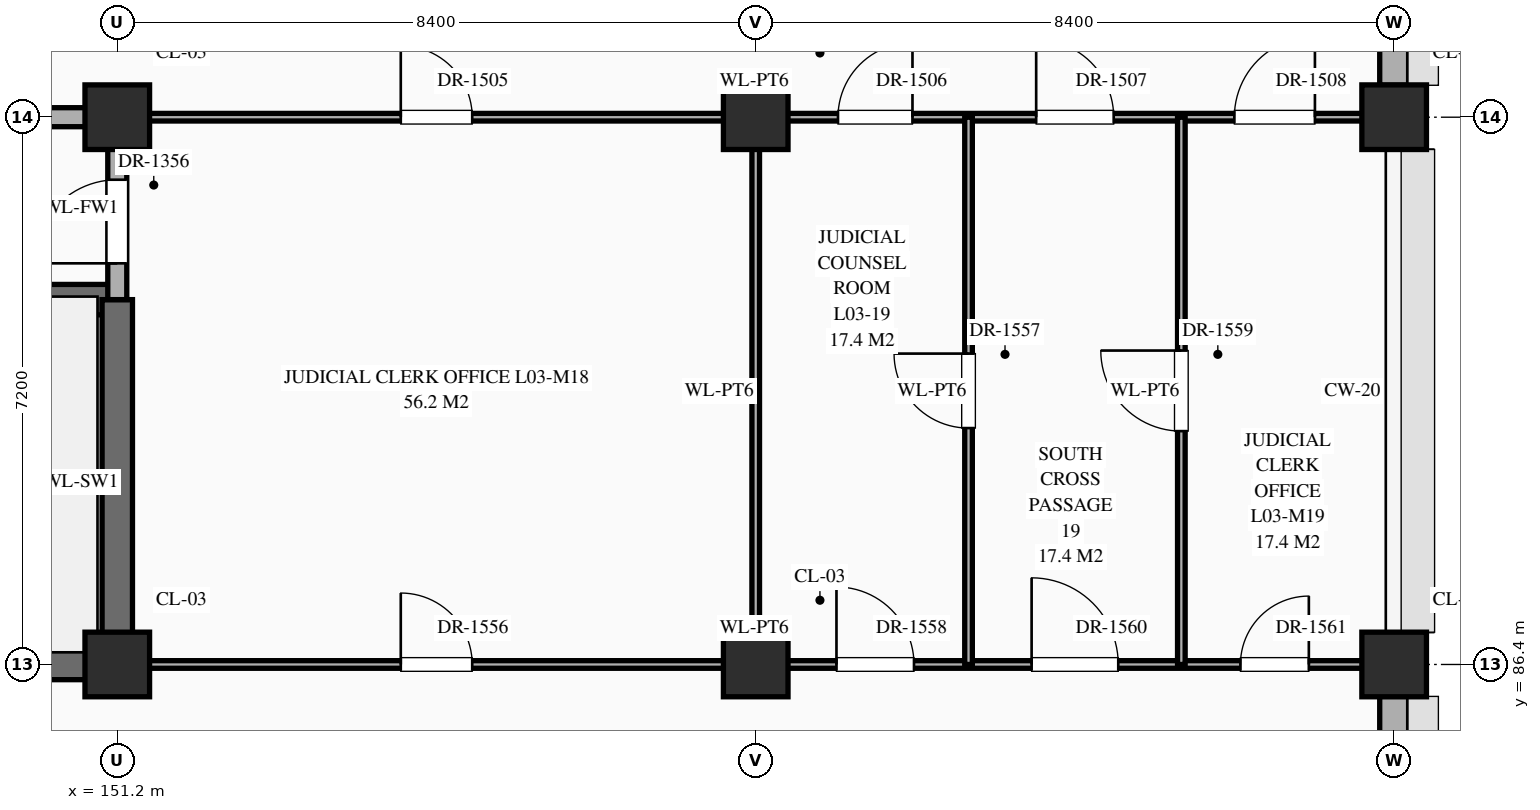
"""IFC4 building model, lengths in metres.
Left out: names, types, materials, properties, quantities, classifications, styles, units other than length and angle.
Written with IfcOpenShell. Run it as: python <this file> out.ifc"""

import sys

from ifc_helpers import new_model, si_unit, direction, frame, frame_2d, origin, origin_2d, place, context, subcontext, project, spatial, rectangle, extrude, element, fill, save


model = new_model("IFC4")
c1 = context("Model", 3, precision=1e-05, world=origin(), true_north=direction((0.0, 1.0)))
c2 = subcontext(c1, "Body", "Model", "MODEL_VIEW")
j1 = project(units=[si_unit("LENGTHUNIT", "METRE"), si_unit("PLANEANGLEUNIT", "RADIAN")], contexts=[c1])
p1 = place(None, origin())
s1 = spatial("IfcSite", under=j1, at=p1, CompositionType="ELEMENT")
p2 = place(p1, origin())
s2 = spatial("IfcBuilding", under=s1, at=p2, CompositionType="ELEMENT")
p3 = place(p2, frame((0.0, 0.0, 10.8)))
s3 = spatial("IfcBuildingStorey", under=s2, at=p3, CompositionType="ELEMENT", Elevation=10.8)
for number, where, z_axis, x_axis in (
    (1, (151.2, 86.4, 0.0), (0.0, 0.0, 1.0), (1.0, 0.0, 0.0)),
    (2, (151.2, 93.6, 0.0), (0.0, 0.0, 1.0), (1.0, 0.0, 0.0)),
    (3, (159.6, 86.4, 0.0), (0.0, 0.0, 1.0), (1.0, 0.0, 0.0)),
    (4, (159.6, 93.6, 0.0), (0.0, 0.0, 1.0), (1.0, 0.0, 0.0)),
    (5, (168.0, 86.4, 0.0), (0.0, 0.0, 1.0), (1.0, 0.0, 0.0)),
    (6, (168.0, 93.6, 0.0), (0.0, 0.0, 1.0), (1.0, 0.0, 0.0)),
):
    element("IfcColumn", number, at=place(p3, frame(where, z_axis=z_axis, x_axis=x_axis)), inside=s3, PredefinedType="COLUMN", context=c2, shape_type="SweptSolid", body=[
        extrude(rectangle(XDim=0.85, YDim=0.85, at=origin_2d()), origin(), (0.0, 0.0, 1.0), 5.4),
    ])
p4 = place(p3, frame((168.0, 79.62, 0.0), z_axis=(0.0, 0.0, 1.0), x_axis=(0.0, 1.0, 0.0)))
e7 = element("IfcWall", 7, at=p4, inside=s3, PredefinedType="STANDARD", context=c2, shape_type="SweptSolid", body=[
    extrude(rectangle(XDim=6.36, YDim=0.38, at=frame_2d((3.18, 0.0))), origin(), (0.0, 0.0, 1.0), 4.47),
])
p5 = place(p4, frame((1.455, 0.0, 0.85)))
e8 = element("IfcOpeningElement", 8, at=p5, cuts=e7, PredefinedType="OPENING", context=c2, shape_type="SweptSolid", body=[
    extrude(rectangle(XDim=1.05, YDim=1.92, at=frame_2d((0.525, 0.96))), frame((0.0, 0.202, 0.0), z_axis=(0.0, -1.0, 0.0), x_axis=(1.0, 0.0, 0.0)), (0.0, 0.0, 1.0), 0.404),
])
p6 = place(p3, frame((168.0, 94.02, 0.0), z_axis=(0.0, 0.0, 1.0), x_axis=(0.0, 1.0, 0.0)))
e9 = element("IfcWall", 9, at=p6, inside=s3, PredefinedType="STANDARD", context=c2, shape_type="SweptSolid", body=[
    extrude(rectangle(XDim=6.36, YDim=0.38, at=frame_2d((3.18, 0.0))), origin(), (0.0, 0.0, 1.0), 4.47),
])
p7 = place(p6, frame((3.805, 0.0, 0.85)))
e10 = element("IfcOpeningElement", 10, at=p7, cuts=e9, PredefinedType="OPENING", context=c2, shape_type="SweptSolid", body=[
    extrude(rectangle(XDim=1.35, YDim=1.2, at=frame_2d((0.675, 0.6))), frame((0.0, 0.202, 0.0), z_axis=(0.0, -1.0, 0.0), x_axis=(1.0, 0.0, 0.0)), (0.0, 0.0, 1.0), 0.404),
])
p8 = place(p3, frame((142.8, 86.4, 0.0), z_axis=(0.0, 0.0, 1.0), x_axis=(1.0, 0.0, 0.0)))
e11 = element("IfcWall", 11, at=p8, inside=s3, PredefinedType="SHEAR", context=c2, shape_type="SweptSolid", body=[
    extrude(rectangle(XDim=8.4, YDim=0.4, at=frame_2d((4.2, 0.0))), origin(), (0.0, 0.0, 1.0), 5.12),
])
p9 = place(p3, frame((151.2, 86.4, 0.0), z_axis=(0.0, 0.0, 1.0), x_axis=(1.0, 0.0, 0.0)))
e12 = element("IfcWall", 12, at=p9, inside=s3, PredefinedType="STANDARD", context=c2, shape_type="SweptSolid", body=[
    extrude(rectangle(XDim=16.76, YDim=0.1, at=frame_2d((8.38, 0.0))), origin(), (0.0, 0.0, 1.0), 4.27),
])
p10 = place(p9, frame((3.73, 0.0, 0.0)))
e13 = element("IfcOpeningElement", 13, at=p10, cuts=e12, PredefinedType="OPENING", context=c2, shape_type="SweptSolid", body=[
    extrude(rectangle(XDim=0.94, YDim=2.3, at=frame_2d((0.47, 1.15))), frame((0.0, 0.062, 0.0), z_axis=(0.0, -1.0, 0.0), x_axis=(1.0, 0.0, 0.0)), (0.0, 0.0, 1.0), 0.124),
])
p11 = place(p9, frame((9.462, 0.0, 0.0)))
e14 = element("IfcOpeningElement", 14, at=p11, cuts=e12, PredefinedType="OPENING", context=c2, shape_type="SweptSolid", body=[
    extrude(rectangle(XDim=1.02, YDim=2.4, at=frame_2d((0.51, 1.2))), frame((0.0, 0.062, 0.0), z_axis=(0.0, -1.0, 0.0), x_axis=(1.0, 0.0, 0.0)), (0.0, 0.0, 1.0), 0.124),
])
p12 = place(p9, frame((12.03, 0.0, 0.0)))
e15 = element("IfcOpeningElement", 15, at=p12, cuts=e12, PredefinedType="OPENING", context=c2, shape_type="SweptSolid", body=[
    extrude(rectangle(XDim=1.14, YDim=2.4, at=frame_2d((0.57, 1.2))), frame((0.0, 0.062, 0.0), z_axis=(0.0, -1.0, 0.0), x_axis=(1.0, 0.0, 0.0)), (0.0, 0.0, 1.0), 0.124),
])
p13 = place(p9, frame((14.778, 0.0, 0.0)))
e16 = element("IfcOpeningElement", 16, at=p13, cuts=e12, PredefinedType="OPENING", context=c2, shape_type="SweptSolid", body=[
    extrude(rectangle(XDim=0.9, YDim=2.15, at=frame_2d((0.45, 1.075))), frame((0.0, 0.062, 0.0), z_axis=(0.0, -1.0, 0.0), x_axis=(1.0, 0.0, 0.0)), (0.0, 0.0, 1.0), 0.124),
])
p14 = place(p3, frame((142.8, 91.2, 0.0), z_axis=(0.0, 0.0, 1.0), x_axis=(1.0, 0.0, 0.0)))
e17 = element("IfcWall", 17, at=p14, inside=s3, PredefinedType="SHEAR", context=c2, shape_type="SweptSolid", body=[
    extrude(rectangle(XDim=8.4, YDim=0.4, at=frame_2d((4.2, 0.0))), origin(), (0.0, 0.0, 1.0), 5.12),
])
p15 = place(p14, frame((0.65, 0.0, 0.0)))
e18 = element("IfcOpeningElement", 18, at=p15, cuts=e17, PredefinedType="OPENING", context=c2, shape_type="SweptSolid", body=[
    extrude(rectangle(XDim=1.1, YDim=2.2, at=frame_2d((0.55, 1.1))), frame((0.0, 0.212, 0.0), z_axis=(0.0, -1.0, 0.0), x_axis=(1.0, 0.0, 0.0)), (0.0, 0.0, 1.0), 0.424),
])
p16 = place(p3, frame((142.8, 93.6, 0.0), z_axis=(0.0, 0.0, 1.0), x_axis=(1.0, 0.0, 0.0)))
e19 = element("IfcWall", 19, at=p16, inside=s3, PredefinedType="STANDARD", context=c2, shape_type="SweptSolid", body=[
    extrude(rectangle(XDim=8.4, YDim=0.25, at=frame_2d((4.2, 0.0))), origin(), (0.0, 0.0, 1.0), 4.27),
])
p17 = place(p16, frame((3.3, 0.0, 0.0)))
e20 = element("IfcOpeningElement", 20, at=p17, cuts=e19, PredefinedType="OPENING", context=c2, shape_type="SweptSolid", body=[
    extrude(rectangle(XDim=1.8, YDim=2.35, at=frame_2d((0.9, 1.175))), frame((0.0, 0.137, 0.0), z_axis=(0.0, -1.0, 0.0), x_axis=(1.0, 0.0, 0.0)), (0.0, 0.0, 1.0), 0.274),
])
p18 = place(p3, frame((151.2, 93.6, 0.0), z_axis=(0.0, 0.0, 1.0), x_axis=(1.0, 0.0, 0.0)))
e21 = element("IfcWall", 21, at=p18, inside=s3, PredefinedType="STANDARD", context=c2, shape_type="SweptSolid", body=[
    extrude(rectangle(XDim=16.76, YDim=0.1, at=frame_2d((8.38, 0.0))), origin(), (0.0, 0.0, 1.0), 4.27),
])
p19 = place(p18, frame((3.73, 0.0, 0.0)))
e22 = element("IfcOpeningElement", 22, at=p19, cuts=e21, PredefinedType="OPENING", context=c2, shape_type="SweptSolid", body=[
    extrude(rectangle(XDim=0.94, YDim=2.3, at=frame_2d((0.47, 1.15))), frame((0.0, 0.062, 0.0), z_axis=(0.0, -1.0, 0.0), x_axis=(1.0, 0.0, 0.0)), (0.0, 0.0, 1.0), 0.124),
])
p20 = place(p18, frame((9.482, 0.0, 0.0)))
e23 = element("IfcOpeningElement", 23, at=p20, cuts=e21, PredefinedType="OPENING", context=c2, shape_type="SweptSolid", body=[
    extrude(rectangle(XDim=0.98, YDim=2.35, at=frame_2d((0.49, 1.175))), frame((0.0, 0.062, 0.0), z_axis=(0.0, -1.0, 0.0), x_axis=(1.0, 0.0, 0.0)), (0.0, 0.0, 1.0), 0.124),
])
p21 = place(p18, frame((12.09, 0.0, 0.0)))
e24 = element("IfcOpeningElement", 24, at=p21, cuts=e21, PredefinedType="OPENING", context=c2, shape_type="SweptSolid", body=[
    extrude(rectangle(XDim=1.02, YDim=2.4, at=frame_2d((0.51, 1.2))), frame((0.0, 0.062, 0.0), z_axis=(0.0, -1.0, 0.0), x_axis=(1.0, 0.0, 0.0)), (0.0, 0.0, 1.0), 0.124),
])
p22 = place(p18, frame((14.698, 0.0, 0.0)))
e25 = element("IfcOpeningElement", 25, at=p22, cuts=e21, PredefinedType="OPENING", context=c2, shape_type="SweptSolid", body=[
    extrude(rectangle(XDim=1.06, YDim=2.4, at=frame_2d((0.53, 1.2))), frame((0.0, 0.062, 0.0), z_axis=(0.0, -1.0, 0.0), x_axis=(1.0, 0.0, 0.0)), (0.0, 0.0, 1.0), 0.124),
])
p23 = place(p3, frame((151.2, 86.4, 0.0), z_axis=(0.0, 0.0, 1.0), x_axis=(0.0, 1.0, 0.0)))
e26 = element("IfcWall", 26, at=p23, inside=s3, PredefinedType="SHEAR", context=c2, shape_type="SweptSolid", body=[
    extrude(rectangle(XDim=4.8, YDim=0.4, at=frame_2d((2.4, 0.0))), origin(), (0.0, 0.0, 1.0), 5.12),
])
p24 = place(p3, frame((151.2, 91.2, 0.0), z_axis=(0.0, 0.0, 1.0), x_axis=(0.0, 1.0, 0.0)))
e27 = element("IfcWall", 27, at=p24, inside=s3, PredefinedType="STANDARD", context=c2, shape_type="SweptSolid", body=[
    extrude(rectangle(XDim=2.4, YDim=0.25, at=frame_2d((1.2, 0.0))), origin(), (0.0, 0.0, 1.0), 4.37),
])
p25 = place(p24, frame((0.478, 0.0, 0.0)))
e28 = element("IfcOpeningElement", 28, at=p25, cuts=e27, PredefinedType="OPENING", context=c2, shape_type="SweptSolid", body=[
    extrude(rectangle(XDim=1.1, YDim=2.2, at=frame_2d((0.55, 1.1))), frame((0.0, 0.137, 0.0), z_axis=(0.0, -1.0, 0.0), x_axis=(1.0, 0.0, 0.0)), (0.0, 0.0, 1.0), 0.274),
])
p26 = place(p3, frame((159.6, 86.4, 0.0), z_axis=(0.0, 0.0, 1.0), x_axis=(0.0, 1.0, 0.0)))
e29 = element("IfcWall", 29, at=p26, inside=s3, PredefinedType="STANDARD", context=c2, shape_type="SweptSolid", body=[
    extrude(rectangle(XDim=7.2, YDim=0.1, at=frame_2d((3.6, 0.0))), origin(), (0.0, 0.0, 1.0), 4.37),
])
p27 = place(p3, frame((162.4, 86.4, 0.0), z_axis=(0.0, 0.0, 1.0), x_axis=(0.0, 1.0, 0.0)))
e30 = element("IfcWall", 30, at=p27, inside=s3, PredefinedType="STANDARD", context=c2, shape_type="SweptSolid", body=[
    extrude(rectangle(XDim=7.2, YDim=0.1, at=frame_2d((3.6, 0.0))), origin(), (0.0, 0.0, 1.0), 5.12),
])
p28 = place(p27, frame((3.11, 0.0, 0.0)))
e31 = element("IfcOpeningElement", 31, at=p28, cuts=e30, PredefinedType="OPENING", context=c2, shape_type="SweptSolid", body=[
    extrude(rectangle(XDim=0.98, YDim=2.35, at=frame_2d((0.49, 1.175))), frame((0.0, 0.062, 0.0), z_axis=(0.0, -1.0, 0.0), x_axis=(1.0, 0.0, 0.0)), (0.0, 0.0, 1.0), 0.124),
])
p29 = place(p3, frame((165.2, 86.4, 0.0), z_axis=(0.0, 0.0, 1.0), x_axis=(0.0, 1.0, 0.0)))
e32 = element("IfcWall", 32, at=p29, inside=s3, PredefinedType="STANDARD", context=c2, shape_type="SweptSolid", body=[
    extrude(rectangle(XDim=7.2, YDim=0.1, at=frame_2d((3.6, 0.0))), origin(), (0.0, 0.0, 1.0), 5.12),
])
p30 = place(p29, frame((3.07, 0.0, 0.0)))
e33 = element("IfcOpeningElement", 33, at=p30, cuts=e32, PredefinedType="OPENING", context=c2, shape_type="SweptSolid", body=[
    extrude(rectangle(XDim=1.06, YDim=2.4, at=frame_2d((0.53, 1.2))), frame((0.0, 0.062, 0.0), z_axis=(0.0, -1.0, 0.0), x_axis=(1.0, 0.0, 0.0)), (0.0, 0.0, 1.0), 0.124),
])
p31 = place(p25, origin())
e34 = element("IfcDoor", 34, at=p31, inside=s3, OperationType="SINGLE_SWING_LEFT", PredefinedType="DOOR", context=c2, shape_type="SweptSolid", body=[
    extrude(rectangle(XDim=1.1, YDim=2.2, at=frame_2d((0.55, 1.1))), frame((0.0, 0.025, 0.0), z_axis=(0.0, -1.0, 0.0), x_axis=(1.0, 0.0, 0.0)), (0.0, 0.0, 1.0), 0.05),
])
fill(e28, e34)
p32 = place(p19, origin())
e35 = element("IfcDoor", 35, at=p32, inside=s3, OperationType="SINGLE_SWING_LEFT", PredefinedType="DOOR", context=c2, shape_type="SweptSolid", body=[
    extrude(rectangle(XDim=0.94, YDim=2.3, at=frame_2d((0.47, 1.15))), frame((0.0, 0.025, 0.0), z_axis=(0.0, -1.0, 0.0), x_axis=(1.0, 0.0, 0.0)), (0.0, 0.0, 1.0), 0.05),
])
fill(e22, e35)
p33 = place(p20, origin())
e36 = element("IfcDoor", 36, at=p33, inside=s3, OperationType="SINGLE_SWING_RIGHT", PredefinedType="DOOR", context=c2, shape_type="SweptSolid", body=[
    extrude(rectangle(XDim=0.98, YDim=2.35, at=frame_2d((0.49, 1.175))), frame((0.0, 0.025, 0.0), z_axis=(0.0, -1.0, 0.0), x_axis=(1.0, 0.0, 0.0)), (0.0, 0.0, 1.0), 0.05),
])
fill(e23, e36)
p34 = place(p21, origin())
e37 = element("IfcDoor", 37, at=p34, inside=s3, OperationType="SINGLE_SWING_LEFT", PredefinedType="DOOR", context=c2, shape_type="SweptSolid", body=[
    extrude(rectangle(XDim=1.02, YDim=2.4, at=frame_2d((0.51, 1.2))), frame((0.0, 0.025, 0.0), z_axis=(0.0, -1.0, 0.0), x_axis=(1.0, 0.0, 0.0)), (0.0, 0.0, 1.0), 0.05),
])
fill(e24, e37)
p35 = place(p22, origin())
e38 = element("IfcDoor", 38, at=p35, inside=s3, OperationType="SINGLE_SWING_RIGHT", PredefinedType="DOOR", context=c2, shape_type="SweptSolid", body=[
    extrude(rectangle(XDim=1.06, YDim=2.4, at=frame_2d((0.53, 1.2))), frame((0.0, 0.025, 0.0), z_axis=(0.0, -1.0, 0.0), x_axis=(1.0, 0.0, 0.0)), (0.0, 0.0, 1.0), 0.05),
])
fill(e25, e38)
p36 = place(p10, origin())
e39 = element("IfcDoor", 39, at=p36, inside=s3, OperationType="SINGLE_SWING_LEFT", PredefinedType="DOOR", context=c2, shape_type="SweptSolid", body=[
    extrude(rectangle(XDim=0.94, YDim=2.3, at=frame_2d((0.47, 1.15))), frame((0.0, 0.025, 0.0), z_axis=(0.0, -1.0, 0.0), x_axis=(1.0, 0.0, 0.0)), (0.0, 0.0, 1.0), 0.05),
])
fill(e13, e39)
p37 = place(p28, origin())
e40 = element("IfcDoor", 40, at=p37, inside=s3, OperationType="SINGLE_SWING_RIGHT", PredefinedType="DOOR", context=c2, shape_type="SweptSolid", body=[
    extrude(rectangle(XDim=0.98, YDim=2.35, at=frame_2d((0.49, 1.175))), frame((0.0, 0.025, 0.0), z_axis=(0.0, -1.0, 0.0), x_axis=(1.0, 0.0, 0.0)), (0.0, 0.0, 1.0), 0.05),
])
fill(e31, e40)
p38 = place(p11, origin())
e41 = element("IfcDoor", 41, at=p38, inside=s3, OperationType="SINGLE_SWING_LEFT", PredefinedType="DOOR", context=c2, shape_type="SweptSolid", body=[
    extrude(rectangle(XDim=1.02, YDim=2.4, at=frame_2d((0.51, 1.2))), frame((0.0, 0.025, 0.0), z_axis=(0.0, -1.0, 0.0), x_axis=(1.0, 0.0, 0.0)), (0.0, 0.0, 1.0), 0.05),
])
fill(e14, e41)
p39 = place(p30, origin())
e42 = element("IfcDoor", 42, at=p39, inside=s3, OperationType="SINGLE_SWING_RIGHT", PredefinedType="DOOR", context=c2, shape_type="SweptSolid", body=[
    extrude(rectangle(XDim=1.06, YDim=2.4, at=frame_2d((0.53, 1.2))), frame((0.0, 0.025, 0.0), z_axis=(0.0, -1.0, 0.0), x_axis=(1.0, 0.0, 0.0)), (0.0, 0.0, 1.0), 0.05),
])
fill(e33, e42)
p40 = place(p12, origin())
e43 = element("IfcDoor", 43, at=p40, inside=s3, OperationType="SINGLE_SWING_LEFT", PredefinedType="DOOR", context=c2, shape_type="SweptSolid", body=[
    extrude(rectangle(XDim=1.14, YDim=2.4, at=frame_2d((0.57, 1.2))), frame((0.0, 0.025, 0.0), z_axis=(0.0, -1.0, 0.0), x_axis=(1.0, 0.0, 0.0)), (0.0, 0.0, 1.0), 0.05),
])
fill(e15, e43)
p41 = place(p13, origin())
e44 = element("IfcDoor", 44, at=p41, inside=s3, OperationType="SINGLE_SWING_RIGHT", PredefinedType="DOOR", context=c2, shape_type="SweptSolid", body=[
    extrude(rectangle(XDim=0.9, YDim=2.15, at=frame_2d((0.45, 1.075))), frame((0.0, 0.025, 0.0), z_axis=(0.0, -1.0, 0.0), x_axis=(1.0, 0.0, 0.0)), (0.0, 0.0, 1.0), 0.05),
])
fill(e16, e44)
save(model, sys.argv[1])
